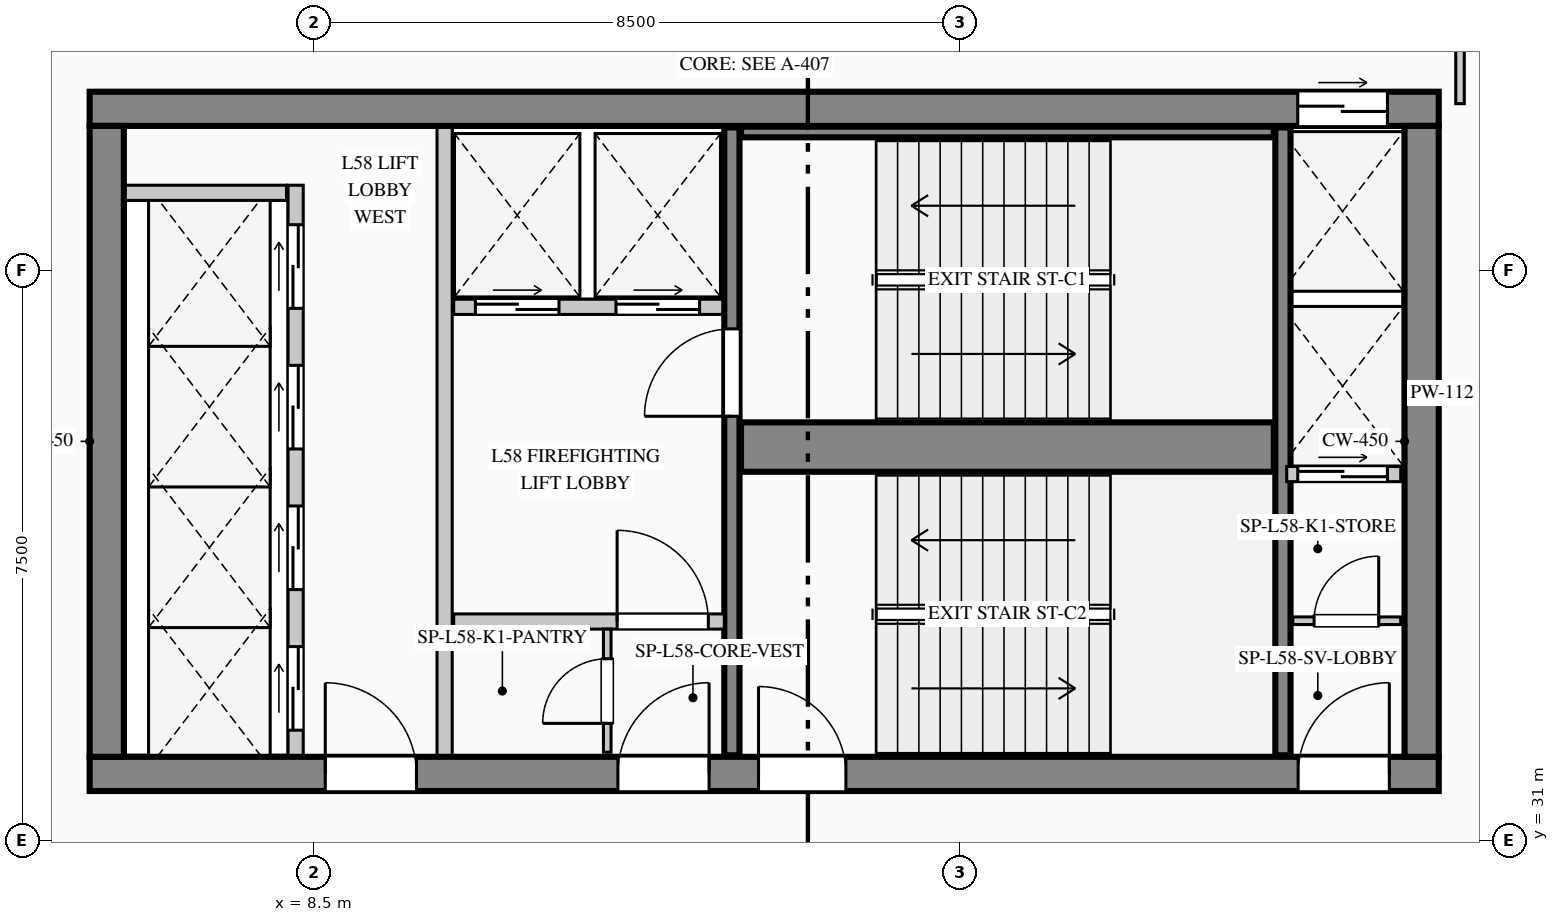
"""IFC4 building model, lengths in metres.
Left out: names, types, materials, properties, quantities, classifications, styles, units other than length and angle.
Written with IfcOpenShell. Run it as: python <this file> out.ifc"""

import sys

from ifc_helpers import new_model, si_unit, direction, frame, frame_2d, origin, place, context, subcontext, project, spatial, rectangle, extrude, element, fill, save


model = new_model("IFC4")
c1 = context("Model", 3, precision=1e-05, world=origin(), true_north=direction((0.0, 1.0)))
c2 = subcontext(c1, "Body", "Model", "MODEL_VIEW")
j1 = project(units=[si_unit("LENGTHUNIT", "METRE"), si_unit("PLANEANGLEUNIT", "RADIAN")], contexts=[c1])
p1 = place(None, origin())
s1 = spatial("IfcSite", under=j1, at=p1, CompositionType="ELEMENT")
p2 = place(p1, origin())
s2 = spatial("IfcBuilding", under=s1, at=p2, CompositionType="ELEMENT")
p3 = place(p2, frame((0.0, 0.0, 243.0)))
s3 = spatial("IfcBuildingStorey", under=s2, at=p3, CompositionType="ELEMENT", Elevation=243.0)
p4 = place(p3, frame((5.55, 40.625, 0.0), z_axis=(0.0, 0.0, 1.0), x_axis=(1.0, 0.0, 0.0)))
e1 = element("IfcWall", 1, at=p4, inside=s3, PredefinedType="SHEAR", context=c2, shape_type="SweptSolid", body=[
    extrude(rectangle(XDim=17.75, YDim=0.45, at=frame_2d((8.875, 0.0))), origin(), (0.0, 0.0, 1.0), 3.95),
])
p5 = place(p4, frame((15.895, 0.0, 0.0)))
e2 = element("IfcOpeningElement", 2, at=p5, cuts=e1, PredefinedType="OPENING", context=c2, shape_type="SweptSolid", body=[
    extrude(rectangle(XDim=1.18, YDim=2.25, at=frame_2d((0.59, 1.125))), frame((0.0, 0.235, 0.0), z_axis=(0.0, -1.0, 0.0), x_axis=(1.0, 0.0, 0.0)), (0.0, 0.0, 1.0), 0.47),
])
p6 = place(p3, frame((5.55, 31.875, 0.0), z_axis=(0.0, 0.0, 1.0), x_axis=(1.0, 0.0, 0.0)))
e3 = element("IfcWall", 3, at=p6, inside=s3, PredefinedType="SHEAR", context=c2, shape_type="SweptSolid", body=[
    extrude(rectangle(XDim=17.75, YDim=0.45, at=frame_2d((8.875, 0.0))), origin(), (0.0, 0.0, 1.0), 3.95),
])
p7 = place(p6, frame((3.1, 0.0, 0.0)))
e4 = element("IfcOpeningElement", 4, at=p7, cuts=e3, PredefinedType="OPENING", context=c2, shape_type="SweptSolid", body=[
    extrude(rectangle(XDim=1.2, YDim=2.2, at=frame_2d((0.6, 1.1))), frame((0.0, 0.235, 0.0), z_axis=(0.0, -1.0, 0.0), x_axis=(1.0, 0.0, 0.0)), (0.0, 0.0, 1.0), 0.47),
])
p8 = place(p6, frame((6.95, 0.0, 0.0)))
e5 = element("IfcOpeningElement", 5, at=p8, cuts=e3, PredefinedType="OPENING", context=c2, shape_type="SweptSolid", body=[
    extrude(rectangle(XDim=1.2, YDim=2.2, at=frame_2d((0.6, 1.1))), frame((0.0, 0.235, 0.0), z_axis=(0.0, -1.0, 0.0), x_axis=(1.0, 0.0, 0.0)), (0.0, 0.0, 1.0), 0.47),
])
p9 = place(p6, frame((8.8, 0.0, 0.0)))
e6 = element("IfcOpeningElement", 6, at=p9, cuts=e3, PredefinedType="OPENING", context=c2, shape_type="SweptSolid", body=[
    extrude(rectangle(XDim=1.15, YDim=2.2, at=frame_2d((0.575, 1.1))), frame((0.0, 0.235, 0.0), z_axis=(0.0, -1.0, 0.0), x_axis=(1.0, 0.0, 0.0)), (0.0, 0.0, 1.0), 0.47),
])
p10 = place(p6, frame((15.9, 0.0, 0.0)))
e7 = element("IfcOpeningElement", 7, at=p10, cuts=e3, PredefinedType="OPENING", context=c2, shape_type="SweptSolid", body=[
    extrude(rectangle(XDim=1.2, YDim=2.2, at=frame_2d((0.6, 1.1))), frame((0.0, 0.235, 0.0), z_axis=(0.0, -1.0, 0.0), x_axis=(1.0, 0.0, 0.0)), (0.0, 0.0, 1.0), 0.47),
])
for number, where, z_axis, x_axis in (
    (8, (5.775, 32.1, 0.0), (0.0, 0.0, 1.0), (0.0, 1.0, 0.0)),
    (9, (23.075, 32.1, 0.0), (0.0, 0.0, 1.0), (0.0, 1.0, 0.0)),
):
    element("IfcWall", number, at=place(p3, frame(where, z_axis=z_axis, x_axis=x_axis)), inside=s3, PredefinedType="SHEAR", context=c2, shape_type="SweptSolid", body=[
        extrude(rectangle(XDim=8.3, YDim=0.45, at=frame_2d((4.15, 0.0))), origin(), (0.0, 0.0, 1.0), 3.95),
    ])
p11 = place(p3, frame((14.0, 32.12, 0.0), z_axis=(0.0, 0.0, 1.0), x_axis=(0.0, 1.0, 0.0)))
e10 = element("IfcWall", 10, at=p11, inside=s3, PredefinedType="SHEAR", context=c2, shape_type="SweptSolid", body=[
    extrude(rectangle(XDim=8.26, YDim=0.2, at=frame_2d((4.13, 0.0))), origin(), (0.0, 0.0, 1.0), 3.95),
])
p12 = place(p11, frame((4.46, 0.0, 0.0)))
e11 = element("IfcOpeningElement", 11, at=p12, cuts=e10, PredefinedType="OPENING", context=c2, shape_type="SweptSolid", body=[
    extrude(rectangle(XDim=1.15, YDim=2.2, at=frame_2d((0.575, 1.1))), frame((0.0, 0.11, 0.0), z_axis=(0.0, -1.0, 0.0), x_axis=(1.0, 0.0, 0.0)), (0.0, 0.0, 1.0), 0.22),
])
p13 = place(p3, frame((14.12, 36.175, 0.0), z_axis=(0.0, 0.0, 1.0), x_axis=(1.0, 0.0, 0.0)))
e12 = element("IfcWall", 12, at=p13, inside=s3, PredefinedType="SHEAR", context=c2, shape_type="SweptSolid", body=[
    extrude(rectangle(XDim=7.01, YDim=0.65, at=frame_2d((3.505, 0.0))), origin(), (0.0, 0.0, 1.0), 3.95),
])
p14 = place(p3, frame((21.25, 32.12, 0.0), z_axis=(0.0, 0.0, 1.0), x_axis=(0.0, 1.0, 0.0)))
e13 = element("IfcWall", 13, at=p14, inside=s3, PredefinedType="SHEAR", context=c2, shape_type="SweptSolid", body=[
    extrude(rectangle(XDim=8.26, YDim=0.2, at=frame_2d((4.13, 0.0))), origin(), (0.0, 0.0, 1.0), 3.95),
])
p15 = place(p3, frame((14.12, 40.32, 0.0), z_axis=(0.0, 0.0, 1.0), x_axis=(1.0, 0.0, 0.0)))
e14 = element("IfcWall", 14, at=p15, inside=s3, PredefinedType="SHEAR", context=c2, shape_type="SweptSolid", body=[
    extrude(rectangle(XDim=7.01, YDim=0.14, at=frame_2d((3.505, 0.0))), origin(), (0.0, 0.0, 1.0), 3.95),
])
p16 = place(p3, frame((6.933, 4.52, 0.0), z_axis=(0.0, 0.0, 1.0), x_axis=(-0.109965284523, 0.993935428587, 0.0)))
e15 = element("IfcWall", 15, at=p16, inside=s3, PredefinedType="STANDARD", context=c2, shape_type="SweptSolid", body=[
    extrude(rectangle(XDim=37.186, YDim=0.24, at=frame_2d((18.593, 0.0))), origin(), (0.0, 0.0, 1.0), 3.7),
])
p17 = place(p16, frame((12.562, 0.0, 0.9)))
e16 = element("IfcOpeningElement", 16, at=p17, cuts=e15, PredefinedType="OPENING", context=c2, shape_type="SweptSolid", body=[
    extrude(rectangle(XDim=1.65, YDim=1.95, at=frame_2d((0.825, 0.975))), frame((0.0, 0.13, 0.0), z_axis=(0.0, -1.0, 0.0), x_axis=(1.0, 0.0, 0.0)), (0.0, 0.0, 1.0), 0.26),
])
p18 = place(p3, frame((8.26, 32.12, 0.0), z_axis=(0.0, 0.0, 1.0), x_axis=(0.0, 1.0, 0.0)))
e17 = element("IfcWall", 17, at=p18, inside=s3, PredefinedType="PARTITIONING", context=c2, shape_type="SweptSolid", body=[
    extrude(rectangle(XDim=7.5, YDim=0.2, at=frame_2d((3.75, 0.0))), origin(), (0.0, 0.0, 1.0), 3.7),
])
p19 = place(p18, frame((0.33, 0.0, 0.0)))
e18 = element("IfcOpeningElement", 18, at=p19, cuts=e17, PredefinedType="OPENING", context=c2, shape_type="SweptSolid", body=[
    extrude(rectangle(XDim=1.1, YDim=2.2, at=frame_2d((0.55, 1.1))), frame((0.0, 0.11, 0.0), z_axis=(0.0, -1.0, 0.0), x_axis=(1.0, 0.0, 0.0)), (0.0, 0.0, 1.0), 0.22),
])
p20 = place(p18, frame((2.18, 0.0, 0.0)))
e19 = element("IfcOpeningElement", 19, at=p20, cuts=e17, PredefinedType="OPENING", context=c2, shape_type="SweptSolid", body=[
    extrude(rectangle(XDim=1.1, YDim=2.2, at=frame_2d((0.55, 1.1))), frame((0.0, 0.11, 0.0), z_axis=(0.0, -1.0, 0.0), x_axis=(1.0, 0.0, 0.0)), (0.0, 0.0, 1.0), 0.22),
])
p21 = place(p18, frame((4.03, 0.0, 0.0)))
e20 = element("IfcOpeningElement", 20, at=p21, cuts=e17, PredefinedType="OPENING", context=c2, shape_type="SweptSolid", body=[
    extrude(rectangle(XDim=1.1, YDim=2.2, at=frame_2d((0.55, 1.1))), frame((0.0, 0.11, 0.0), z_axis=(0.0, -1.0, 0.0), x_axis=(1.0, 0.0, 0.0)), (0.0, 0.0, 1.0), 0.22),
])
p22 = place(p18, frame((5.88, 0.0, 0.0)))
e21 = element("IfcOpeningElement", 21, at=p22, cuts=e17, PredefinedType="OPENING", context=c2, shape_type="SweptSolid", body=[
    extrude(rectangle(XDim=1.1, YDim=2.2, at=frame_2d((0.55, 1.1))), frame((0.0, 0.11, 0.0), z_axis=(0.0, -1.0, 0.0), x_axis=(1.0, 0.0, 0.0)), (0.0, 0.0, 1.0), 0.22),
])
p23 = place(p3, frame((6.02, 39.52, 0.0), z_axis=(0.0, 0.0, 1.0), x_axis=(1.0, 0.0, 0.0)))
e22 = element("IfcWall", 22, at=p23, inside=s3, PredefinedType="PARTITIONING", context=c2, shape_type="SweptSolid", body=[
    extrude(rectangle(XDim=2.12, YDim=0.2, at=frame_2d((1.06, 0.0))), origin(), (0.0, 0.0, 1.0), 3.7),
])
p24 = place(p3, frame((10.22, 32.12, 0.0), z_axis=(0.0, 0.0, 1.0), x_axis=(0.0, 1.0, 0.0)))
e23 = element("IfcWall", 23, at=p24, inside=s3, PredefinedType="PARTITIONING", context=c2, shape_type="SweptSolid", body=[
    extrude(rectangle(XDim=8.26, YDim=0.2, at=frame_2d((4.13, 0.0))), origin(), (0.0, 0.0, 1.0), 3.7),
])
p25 = place(p3, frame((10.34, 38.02, 0.0), z_axis=(0.0, 0.0, 1.0), x_axis=(1.0, 0.0, 0.0)))
e24 = element("IfcWall", 24, at=p25, inside=s3, PredefinedType="PARTITIONING", context=c2, shape_type="SweptSolid", body=[
    extrude(rectangle(XDim=3.54, YDim=0.2, at=frame_2d((1.77, 0.0))), origin(), (0.0, 0.0, 1.0), 3.7),
])
p26 = place(p25, frame((0.285, 0.0, 0.0)))
e25 = element("IfcOpeningElement", 25, at=p26, cuts=e24, PredefinedType="OPENING", context=c2, shape_type="SweptSolid", body=[
    extrude(rectangle(XDim=1.1, YDim=2.2, at=frame_2d((0.55, 1.1))), frame((0.0, 0.11, 0.0), z_axis=(0.0, -1.0, 0.0), x_axis=(1.0, 0.0, 0.0)), (0.0, 0.0, 1.0), 0.22),
])
p27 = place(p25, frame((2.135, 0.0, 0.0)))
e26 = element("IfcOpeningElement", 26, at=p27, cuts=e24, PredefinedType="OPENING", context=c2, shape_type="SweptSolid", body=[
    extrude(rectangle(XDim=1.1, YDim=2.2, at=frame_2d((0.55, 1.1))), frame((0.0, 0.11, 0.0), z_axis=(0.0, -1.0, 0.0), x_axis=(1.0, 0.0, 0.0)), (0.0, 0.0, 1.0), 0.22),
])
p28 = place(p3, frame((10.34, 33.88, 0.0), z_axis=(0.0, 0.0, 1.0), x_axis=(1.0, 0.0, 0.0)))
e27 = element("IfcWall", 27, at=p28, inside=s3, PredefinedType="PARTITIONING", context=c2, shape_type="SweptSolid", body=[
    extrude(rectangle(XDim=3.56, YDim=0.2, at=frame_2d((1.78, 0.0))), origin(), (0.0, 0.0, 1.0), 3.7),
])
p29 = place(p28, frame((2.15, 0.0, 0.0)))
e28 = element("IfcOpeningElement", 28, at=p29, cuts=e27, PredefinedType="OPENING", context=c2, shape_type="SweptSolid", body=[
    extrude(rectangle(XDim=1.2, YDim=2.2, at=frame_2d((0.6, 1.1))), frame((0.0, 0.11, 0.0), z_axis=(0.0, -1.0, 0.0), x_axis=(1.0, 0.0, 0.0)), (0.0, 0.0, 1.0), 0.22),
])
p30 = place(p3, frame((12.36, 32.16, 0.0), z_axis=(0.0, 0.0, 1.0), x_axis=(0.0, 1.0, 0.0)))
e29 = element("IfcWall", 29, at=p30, inside=s3, PredefinedType="PARTITIONING", context=c2, shape_type="SweptSolid", body=[
    extrude(rectangle(XDim=1.62, YDim=0.1, at=frame_2d((0.81, 0.0))), origin(), (0.0, 0.0, 1.0), 3.7),
])
p31 = place(p30, frame((0.38, 0.0, 0.0)))
e30 = element("IfcOpeningElement", 30, at=p31, cuts=e29, PredefinedType="OPENING", context=c2, shape_type="SweptSolid", body=[
    extrude(rectangle(XDim=0.85, YDim=2.1, at=frame_2d((0.425, 1.05))), frame((0.0, 0.06, 0.0), z_axis=(0.0, -1.0, 0.0), x_axis=(1.0, 0.0, 0.0)), (0.0, 0.0, 1.0), 0.12),
])
p32 = place(p3, frame((21.38, 33.89, 0.0), z_axis=(0.0, 0.0, 1.0), x_axis=(1.0, 0.0, 0.0)))
e31 = element("IfcWall", 31, at=p32, inside=s3, PredefinedType="PARTITIONING", context=c2, shape_type="SweptSolid", body=[
    extrude(rectangle(XDim=1.42, YDim=0.1, at=frame_2d((0.71, 0.0))), origin(), (0.0, 0.0, 1.0), 3.7),
])
p33 = place(p32, frame((0.28, 0.0, 0.0)))
e32 = element("IfcOpeningElement", 32, at=p33, cuts=e31, PredefinedType="OPENING", context=c2, shape_type="SweptSolid", body=[
    extrude(rectangle(XDim=0.85, YDim=2.1, at=frame_2d((0.425, 1.05))), frame((0.0, 0.06, 0.0), z_axis=(0.0, -1.0, 0.0), x_axis=(1.0, 0.0, 0.0)), (0.0, 0.0, 1.0), 0.12),
])
p34 = place(p3, frame((21.3, 35.82, 0.0), z_axis=(0.0, 0.0, 1.0), x_axis=(1.0, 0.0, 0.0)))
e33 = element("IfcWall", 33, at=p34, inside=s3, PredefinedType="PARTITIONING", context=c2, shape_type="SweptSolid", body=[
    extrude(rectangle(XDim=1.5, YDim=0.2, at=frame_2d((0.75, 0.0))), origin(), (0.0, 0.0, 1.0), 3.7),
])
p35 = place(p34, frame((0.145, 0.0, 0.0)))
e34 = element("IfcOpeningElement", 34, at=p35, cuts=e33, PredefinedType="OPENING", context=c2, shape_type="SweptSolid", body=[
    extrude(rectangle(XDim=1.18, YDim=2.25, at=frame_2d((0.59, 1.125))), frame((0.0, 0.11, 0.0), z_axis=(0.0, -1.0, 0.0), x_axis=(1.0, 0.0, 0.0)), (0.0, 0.0, 1.0), 0.22),
])
p36 = place(p3, frame((23.58, 40.693, 0.0), z_axis=(0.0, 0.0, 1.0), x_axis=(0.0, 1.0, 0.0)))
e35 = element("IfcWall", 35, at=p36, inside=s3, PredefinedType="PARTITIONING", context=c2, shape_type="SweptSolid", body=[
    extrude(rectangle(XDim=2.582, YDim=0.112, at=frame_2d((1.291, 0.0))), origin(), (0.0, 0.0, 1.0), 3.7),
])
p37 = place(p7, origin())
e36 = element("IfcDoor", 36, at=p37, inside=s3, OperationType="SINGLE_SWING_LEFT", PredefinedType="DOOR", context=c2, shape_type="SweptSolid", body=[
    extrude(rectangle(XDim=1.2, YDim=2.2, at=frame_2d((0.6, 1.1))), frame((0.0, 0.025, 0.0), z_axis=(0.0, -1.0, 0.0), x_axis=(1.0, 0.0, 0.0)), (0.0, 0.0, 1.0), 0.05),
])
fill(e4, e36)
p38 = place(p8, origin())
e37 = element("IfcDoor", 37, at=p38, inside=s3, OperationType="SINGLE_SWING_RIGHT", PredefinedType="DOOR", context=c2, shape_type="SweptSolid", body=[
    extrude(rectangle(XDim=1.2, YDim=2.2, at=frame_2d((0.6, 1.1))), frame((0.0, 0.025, 0.0), z_axis=(0.0, -1.0, 0.0), x_axis=(1.0, 0.0, 0.0)), (0.0, 0.0, 1.0), 0.05),
])
fill(e5, e37)
p39 = place(p9, origin())
e38 = element("IfcDoor", 38, at=p39, inside=s3, OperationType="SINGLE_SWING_LEFT", PredefinedType="DOOR", context=c2, shape_type="SweptSolid", body=[
    extrude(rectangle(XDim=1.15, YDim=2.2, at=frame_2d((0.575, 1.1))), frame((0.0, 0.025, 0.0), z_axis=(0.0, -1.0, 0.0), x_axis=(1.0, 0.0, 0.0)), (0.0, 0.0, 1.0), 0.05),
])
fill(e6, e38)
p40 = place(p10, origin())
e39 = element("IfcDoor", 39, at=p40, inside=s3, OperationType="SINGLE_SWING_RIGHT", PredefinedType="DOOR", context=c2, shape_type="SweptSolid", body=[
    extrude(rectangle(XDim=1.2, YDim=2.2, at=frame_2d((0.6, 1.1))), frame((0.0, 0.025, 0.0), z_axis=(0.0, -1.0, 0.0), x_axis=(1.0, 0.0, 0.0)), (0.0, 0.0, 1.0), 0.05),
])
fill(e7, e39)
p41 = place(p29, origin())
e40 = element("IfcDoor", 40, at=p41, inside=s3, OperationType="SINGLE_SWING_LEFT", PredefinedType="DOOR", context=c2, shape_type="SweptSolid", body=[
    extrude(rectangle(XDim=1.2, YDim=2.2, at=frame_2d((0.6, 1.1))), frame((0.0, 0.025, 0.0), z_axis=(0.0, -1.0, 0.0), x_axis=(1.0, 0.0, 0.0)), (0.0, 0.0, 1.0), 0.05),
])
fill(e28, e40)
p42 = place(p31, origin())
e41 = element("IfcDoor", 41, at=p42, inside=s3, OperationType="SINGLE_SWING_LEFT", PredefinedType="DOOR", context=c2, shape_type="SweptSolid", body=[
    extrude(rectangle(XDim=0.85, YDim=2.1, at=frame_2d((0.425, 1.05))), frame((0.0, 0.025, 0.0), z_axis=(0.0, -1.0, 0.0), x_axis=(1.0, 0.0, 0.0)), (0.0, 0.0, 1.0), 0.05),
])
fill(e30, e41)
p43 = place(p33, origin())
e42 = element("IfcDoor", 42, at=p43, inside=s3, OperationType="SINGLE_SWING_RIGHT", PredefinedType="DOOR", context=c2, shape_type="SweptSolid", body=[
    extrude(rectangle(XDim=0.85, YDim=2.1, at=frame_2d((0.425, 1.05))), frame((0.0, 0.025, 0.0), z_axis=(0.0, -1.0, 0.0), x_axis=(1.0, 0.0, 0.0)), (0.0, 0.0, 1.0), 0.05),
])
fill(e32, e42)
p44 = place(p12, origin())
e43 = element("IfcDoor", 43, at=p44, inside=s3, OperationType="SINGLE_SWING_LEFT", PredefinedType="DOOR", context=c2, shape_type="SweptSolid", body=[
    extrude(rectangle(XDim=1.15, YDim=2.2, at=frame_2d((0.575, 1.1))), frame((0.0, 0.025, 0.0), z_axis=(0.0, -1.0, 0.0), x_axis=(1.0, 0.0, 0.0)), (0.0, 0.0, 1.0), 0.05),
])
fill(e11, e43)
p45 = place(p19, origin())
e44 = element("IfcDoor", 44, at=p45, inside=s3, OperationType="DOUBLE_DOOR_SLIDING", PredefinedType="DOOR", context=c2, shape_type="SweptSolid", body=[
    extrude(rectangle(XDim=1.1, YDim=2.2, at=frame_2d((0.55, 1.1))), frame((0.0, 0.025, 0.0), z_axis=(0.0, -1.0, 0.0), x_axis=(1.0, 0.0, 0.0)), (0.0, 0.0, 1.0), 0.05),
])
fill(e18, e44)
p46 = place(p20, origin())
e45 = element("IfcDoor", 45, at=p46, inside=s3, OperationType="DOUBLE_DOOR_SLIDING", PredefinedType="DOOR", context=c2, shape_type="SweptSolid", body=[
    extrude(rectangle(XDim=1.1, YDim=2.2, at=frame_2d((0.55, 1.1))), frame((0.0, 0.025, 0.0), z_axis=(0.0, -1.0, 0.0), x_axis=(1.0, 0.0, 0.0)), (0.0, 0.0, 1.0), 0.05),
])
fill(e19, e45)
p47 = place(p21, origin())
e46 = element("IfcDoor", 46, at=p47, inside=s3, OperationType="DOUBLE_DOOR_SLIDING", PredefinedType="DOOR", context=c2, shape_type="SweptSolid", body=[
    extrude(rectangle(XDim=1.1, YDim=2.2, at=frame_2d((0.55, 1.1))), frame((0.0, 0.025, 0.0), z_axis=(0.0, -1.0, 0.0), x_axis=(1.0, 0.0, 0.0)), (0.0, 0.0, 1.0), 0.05),
])
fill(e20, e46)
p48 = place(p22, origin())
e47 = element("IfcDoor", 47, at=p48, inside=s3, OperationType="DOUBLE_DOOR_SLIDING", PredefinedType="DOOR", context=c2, shape_type="SweptSolid", body=[
    extrude(rectangle(XDim=1.1, YDim=2.2, at=frame_2d((0.55, 1.1))), frame((0.0, 0.025, 0.0), z_axis=(0.0, -1.0, 0.0), x_axis=(1.0, 0.0, 0.0)), (0.0, 0.0, 1.0), 0.05),
])
fill(e21, e47)
p49 = place(p26, origin())
e48 = element("IfcDoor", 48, at=p49, inside=s3, OperationType="DOUBLE_DOOR_SLIDING", PredefinedType="DOOR", context=c2, shape_type="SweptSolid", body=[
    extrude(rectangle(XDim=1.1, YDim=2.2, at=frame_2d((0.55, 1.1))), frame((0.0, 0.025, 0.0), z_axis=(0.0, -1.0, 0.0), x_axis=(1.0, 0.0, 0.0)), (0.0, 0.0, 1.0), 0.05),
])
fill(e25, e48)
p50 = place(p27, origin())
e49 = element("IfcDoor", 49, at=p50, inside=s3, OperationType="DOUBLE_DOOR_SLIDING", PredefinedType="DOOR", context=c2, shape_type="SweptSolid", body=[
    extrude(rectangle(XDim=1.1, YDim=2.2, at=frame_2d((0.55, 1.1))), frame((0.0, 0.025, 0.0), z_axis=(0.0, -1.0, 0.0), x_axis=(1.0, 0.0, 0.0)), (0.0, 0.0, 1.0), 0.05),
])
fill(e26, e49)
p51 = place(p5, origin())
e50 = element("IfcDoor", 50, at=p51, inside=s3, OperationType="DOUBLE_DOOR_SLIDING", PredefinedType="DOOR", context=c2, shape_type="SweptSolid", body=[
    extrude(rectangle(XDim=1.18, YDim=2.25, at=frame_2d((0.59, 1.125))), frame((0.0, 0.025, 0.0), z_axis=(0.0, -1.0, 0.0), x_axis=(1.0, 0.0, 0.0)), (0.0, 0.0, 1.0), 0.05),
])
fill(e2, e50)
p52 = place(p35, origin())
e51 = element("IfcDoor", 51, at=p52, inside=s3, OperationType="DOUBLE_DOOR_SLIDING", PredefinedType="DOOR", context=c2, shape_type="SweptSolid", body=[
    extrude(rectangle(XDim=1.18, YDim=2.25, at=frame_2d((0.59, 1.125))), frame((0.0, 0.025, 0.0), z_axis=(0.0, -1.0, 0.0), x_axis=(1.0, 0.0, 0.0)), (0.0, 0.0, 1.0), 0.05),
])
fill(e34, e51)
save(model, sys.argv[1])
